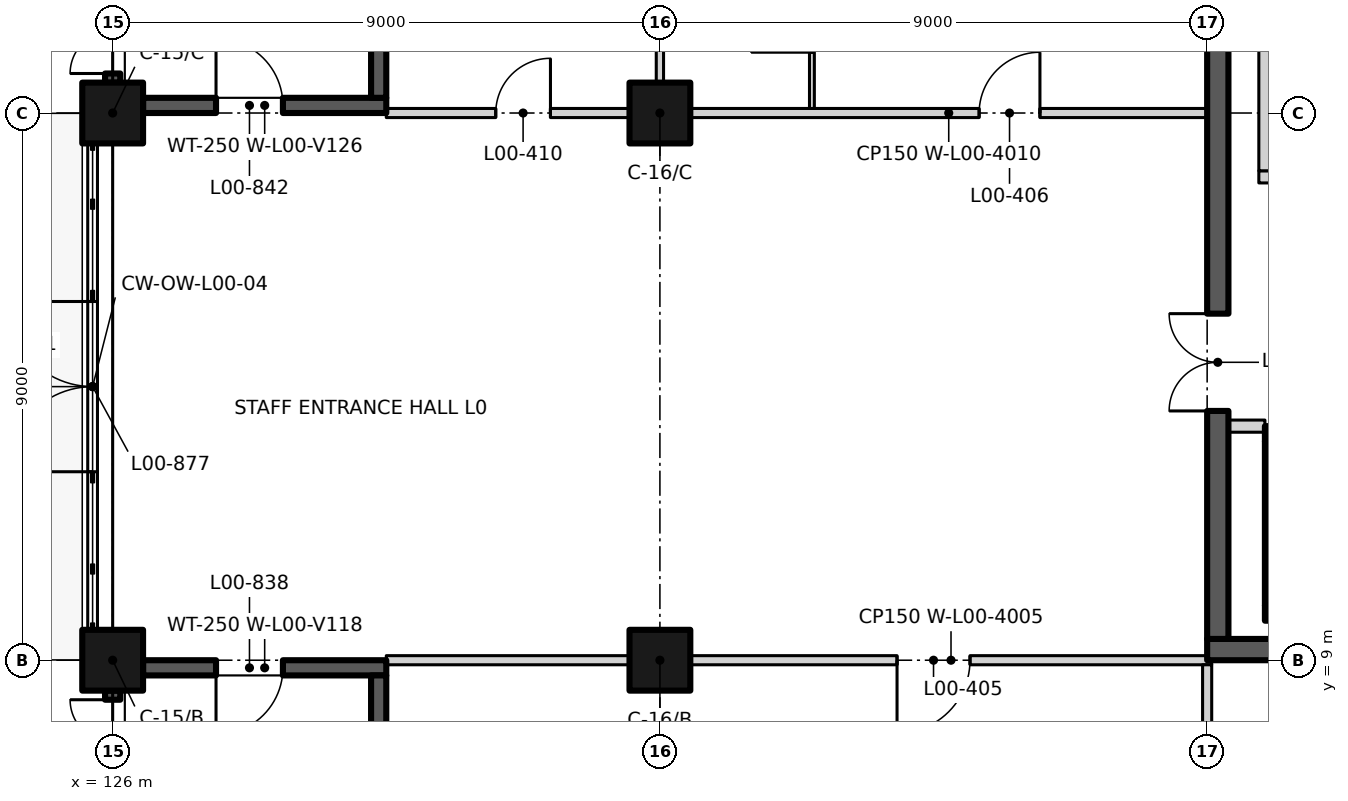
"""IFC4 building model, lengths in metres.
Left out: names, types, materials, properties, quantities, classifications, styles, units other than length and angle.
Written with IfcOpenShell. Run it as: python <this file> out.ifc"""

import sys

from ifc_helpers import new_model, si_unit, direction, frame, frame_2d, origin, origin_2d, place, context, subcontext, project, spatial, rectangle, extrude, element, fill, save


model = new_model("IFC4")
c1 = context("Model", 3, precision=1e-05, world=origin(), true_north=direction((0.0, 1.0)))
c2 = subcontext(c1, "Body", "Model", "MODEL_VIEW")
j1 = project(units=[si_unit("LENGTHUNIT", "METRE"), si_unit("PLANEANGLEUNIT", "RADIAN")], contexts=[c1])
p1 = place(None, origin())
s1 = spatial("IfcSite", under=j1, at=p1, CompositionType="ELEMENT")
p2 = place(p1, origin())
s2 = spatial("IfcBuilding", under=s1, at=p2, CompositionType="ELEMENT")
p3 = place(p2, origin())
s3 = spatial("IfcBuildingStorey", under=s2, at=p3, CompositionType="ELEMENT", Elevation=0.0)
for number, where, z_axis, x_axis in (
    (1, (126.0, 9.0, 0.0), (0.0, 0.0, 1.0), (1.0, 0.0, 0.0)),
    (2, (135.0, 9.0, 0.0), (0.0, 0.0, 1.0), (1.0, 0.0, 0.0)),
    (3, (126.0, 18.0, 0.0), (0.0, 0.0, 1.0), (1.0, 0.0, 0.0)),
    (4, (135.0, 18.0, 0.0), (0.0, 0.0, 1.0), (1.0, 0.0, 0.0)),
):
    element("IfcColumn", number, at=place(p3, frame(where, z_axis=z_axis, x_axis=x_axis)), inside=s3, PredefinedType="COLUMN", context=c2, shape_type="SweptSolid", body=[
        extrude(rectangle(XDim=1.0, YDim=1.0, at=origin_2d()), origin(), (0.0, 0.0, 1.0), 6.0),
    ])
p4 = place(p3, frame((126.5, 8.875, 0.0), z_axis=(0.0, 0.0, 1.0), x_axis=(1.0, 0.0, 0.0)))
e5 = element("IfcWall", 5, at=p4, inside=s3, PredefinedType="SHEAR", context=c2, shape_type="SweptSolid", body=[
    extrude(rectangle(XDim=4.0, YDim=0.25, at=frame_2d((2.0, 0.0))), origin(), (0.0, 0.0, 1.0), 6.0),
])
p5 = place(p4, frame((2.3, 0.0, 0.0), z_axis=(0.0, 0.0, 1.0), x_axis=(-1.0, 0.0, 0.0)))
e6 = element("IfcOpeningElement", 6, at=p5, cuts=e5, PredefinedType="OPENING", context=c2, shape_type="SweptSolid", body=[
    extrude(rectangle(XDim=1.1, YDim=2.1, at=frame_2d((0.55, 1.05))), frame((0.0, 0.135, 0.0), z_axis=(0.0, -1.0, 0.0), x_axis=(1.0, 0.0, 0.0)), (0.0, 0.0, 1.0), 0.27),
])
p6 = place(p3, frame((126.0, 0.5, 0.0), z_axis=(0.0, 0.0, 1.0), x_axis=(0.0, 1.0, 0.0)))
e7 = element("IfcWall", 7, at=p6, inside=s3, PredefinedType="SHEAR", context=c2, shape_type="SweptSolid", body=[
    extrude(rectangle(XDim=8.0, YDim=0.25, at=frame_2d((4.0, 0.0))), origin(), (0.0, 0.0, 1.0), 6.0),
])
p7 = place(p6, frame((6.45, 0.0, 0.0)))
e8 = element("IfcOpeningElement", 8, at=p7, cuts=e7, PredefinedType="OPENING", context=c2, shape_type="SweptSolid", body=[
    extrude(rectangle(XDim=1.4, YDim=2.1, at=frame_2d((0.7, 1.05))), frame((0.0, 0.135, 0.0), z_axis=(0.0, -1.0, 0.0), x_axis=(1.0, 0.0, 0.0)), (0.0, 0.0, 1.0), 0.27),
])
p8 = place(p3, frame((130.375, 0.125, 0.0), z_axis=(0.0, 0.0, 1.0), x_axis=(0.0, 1.0, 0.0)))
e9 = element("IfcWall", 9, at=p8, inside=s3, PredefinedType="SHEAR", context=c2, shape_type="SweptSolid", body=[
    extrude(rectangle(XDim=8.625, YDim=0.25, at=frame_2d((4.312, 0.0))), origin(), (0.0, 0.0, 1.0), 6.0),
])
p9 = place(p3, frame((126.5, 18.125, 0.0), z_axis=(0.0, 0.0, 1.0), x_axis=(1.0, 0.0, 0.0)))
e10 = element("IfcWall", 10, at=p9, inside=s3, PredefinedType="SHEAR", context=c2, shape_type="SweptSolid", body=[
    extrude(rectangle(XDim=4.0, YDim=0.25, at=frame_2d((2.0, 0.0))), origin(), (0.0, 0.0, 1.0), 6.0),
])
p10 = place(p9, frame((1.2, 0.0, 0.0)))
e11 = element("IfcOpeningElement", 11, at=p10, cuts=e10, PredefinedType="OPENING", context=c2, shape_type="SweptSolid", body=[
    extrude(rectangle(XDim=1.1, YDim=2.1, at=frame_2d((0.55, 1.05))), frame((0.0, 0.135, 0.0), z_axis=(0.0, -1.0, 0.0), x_axis=(1.0, 0.0, 0.0)), (0.0, 0.0, 1.0), 0.27),
])
p11 = place(p3, frame((126.0, 18.5, 0.0), z_axis=(0.0, 0.0, 1.0), x_axis=(0.0, 1.0, 0.0)))
e12 = element("IfcWall", 12, at=p11, inside=s3, PredefinedType="SHEAR", context=c2, shape_type="SweptSolid", body=[
    extrude(rectangle(XDim=8.0, YDim=0.25, at=frame_2d((4.0, 0.0))), origin(), (0.0, 0.0, 1.0), 6.0),
])
p12 = place(p11, frame((0.15, 0.0, 0.0)))
e13 = element("IfcOpeningElement", 13, at=p12, cuts=e12, PredefinedType="OPENING", context=c2, shape_type="SweptSolid", body=[
    extrude(rectangle(XDim=1.4, YDim=2.1, at=frame_2d((0.7, 1.05))), frame((0.0, 0.135, 0.0), z_axis=(0.0, -1.0, 0.0), x_axis=(1.0, 0.0, 0.0)), (0.0, 0.0, 1.0), 0.27),
])
p13 = place(p3, frame((130.375, 18.25, 0.0), z_axis=(0.0, 0.0, 1.0), x_axis=(0.0, 1.0, 0.0)))
e14 = element("IfcWall", 14, at=p13, inside=s3, PredefinedType="SHEAR", context=c2, shape_type="SweptSolid", body=[
    extrude(rectangle(XDim=8.625, YDim=0.25, at=frame_2d((4.312, 0.0))), origin(), (0.0, 0.0, 1.0), 6.0),
])
p14 = place(p3, frame((144.95, 12.725, 0.0), z_axis=(0.0, 0.0, 1.0), x_axis=(1.0, 0.0, 0.0)))
e15 = element("IfcWall", 15, at=p14, inside=s3, PredefinedType="SHEAR", context=c2, shape_type="SweptSolid", body=[
    extrude(rectangle(XDim=12.05, YDim=0.25, at=frame_2d((6.025, 0.0))), origin(), (0.0, 0.0, 1.0), 6.0),
])
p15 = place(p14, frame((1.05, 0.0, 0.0)))
e16 = element("IfcOpeningElement", 16, at=p15, cuts=e15, PredefinedType="OPENING", context=c2, shape_type="SweptSolid", body=[
    extrude(rectangle(XDim=1.1, YDim=2.1, at=frame_2d((0.55, 1.05))), frame((0.0, 0.135, 0.0), z_axis=(0.0, -1.0, 0.0), x_axis=(1.0, 0.0, 0.0)), (0.0, 0.0, 1.0), 0.27),
])
p16 = place(p14, frame((4.0, 0.0, 0.0)))
e17 = element("IfcOpeningElement", 17, at=p16, cuts=e15, PredefinedType="OPENING", context=c2, shape_type="SweptSolid", body=[
    extrude(rectangle(XDim=1.1, YDim=2.1, at=frame_2d((0.55, 1.05))), frame((0.0, 0.135, 0.0), z_axis=(0.0, -1.0, 0.0), x_axis=(1.0, 0.0, 0.0)), (0.0, 0.0, 1.0), 0.27),
])
p17 = place(p14, frame((6.95, 0.0, 0.0)))
e18 = element("IfcOpeningElement", 18, at=p17, cuts=e15, PredefinedType="OPENING", context=c2, shape_type="SweptSolid", body=[
    extrude(rectangle(XDim=1.1, YDim=2.1, at=frame_2d((0.55, 1.05))), frame((0.0, 0.135, 0.0), z_axis=(0.0, -1.0, 0.0), x_axis=(1.0, 0.0, 0.0)), (0.0, 0.0, 1.0), 0.27),
])
p18 = place(p14, frame((9.9, 0.0, 0.0)))
e19 = element("IfcOpeningElement", 19, at=p18, cuts=e15, PredefinedType="OPENING", context=c2, shape_type="SweptSolid", body=[
    extrude(rectangle(XDim=1.1, YDim=2.1, at=frame_2d((0.55, 1.05))), frame((0.0, 0.135, 0.0), z_axis=(0.0, -1.0, 0.0), x_axis=(1.0, 0.0, 0.0)), (0.0, 0.0, 1.0), 0.27),
])
p19 = place(p3, frame((144.95, 9.775, 0.0), z_axis=(0.0, 0.0, 1.0), x_axis=(1.0, 0.0, 0.0)))
e20 = element("IfcWall", 20, at=p19, inside=s3, PredefinedType="SHEAR", context=c2, shape_type="SweptSolid", body=[
    extrude(rectangle(XDim=12.05, YDim=0.25, at=frame_2d((6.025, 0.0))), origin(), (0.0, 0.0, 1.0), 6.0),
])
p20 = place(p3, frame((145.075, 9.9, 0.0), z_axis=(0.0, 0.0, 1.0), x_axis=(0.0, 1.0, 0.0)))
e21 = element("IfcWall", 21, at=p20, inside=s3, PredefinedType="SHEAR", context=c2, shape_type="SweptSolid", body=[
    extrude(rectangle(XDim=2.7, YDim=0.25, at=frame_2d((1.35, 0.0))), origin(), (0.0, 0.0, 1.0), 6.0),
])
p21 = place(p3, frame((125.67, 12.03, 0.0), z_axis=(0.0, 0.0, 1.0), x_axis=(0.0, 1.0, 0.0)))
e22 = element("IfcWall", 22, at=p21, inside=s3, PredefinedType="STANDARD", context=c2, shape_type="SweptSolid", body=[
    extrude(rectangle(XDim=2.94, YDim=0.12, at=frame_2d((1.47, 0.0))), origin(), (0.0, 0.0, 1.0), 2.97),
])
p22 = place(p21, frame((0.07, 0.0, 0.0)))
e23 = element("IfcOpeningElement", 23, at=p22, cuts=e22, PredefinedType="OPENING", context=c2, shape_type="SweptSolid", body=[
    extrude(rectangle(XDim=2.8, YDim=2.4, at=frame_2d((1.4, 1.2))), frame((0.0, 0.07, 0.0), z_axis=(0.0, -1.0, 0.0), x_axis=(1.0, 0.0, 0.0)), (0.0, 0.0, 1.0), 0.14),
])
p23 = place(p3, frame((130.5, 9.0, 0.0), z_axis=(0.0, 0.0, 1.0), x_axis=(1.0, 0.0, 0.0)))
e24 = element("IfcWall", 24, at=p23, inside=s3, PredefinedType="PARTITIONING", context=c2, shape_type="SweptSolid", body=[
    extrude(rectangle(XDim=4.0, YDim=0.15, at=frame_2d((2.0, 0.0))), origin(), (0.0, 0.0, 1.0), 5.7),
])
p24 = place(p3, frame((135.5, 9.0, 0.0), z_axis=(0.0, 0.0, 1.0), x_axis=(1.0, 0.0, 0.0)))
e25 = element("IfcWall", 25, at=p24, inside=s3, PredefinedType="PARTITIONING", context=c2, shape_type="SweptSolid", body=[
    extrude(rectangle(XDim=8.575, YDim=0.15, at=frame_2d((4.288, 0.0))), origin(), (0.0, 0.0, 1.0), 5.7),
])
p25 = place(p24, frame((4.6, 0.0, 0.0), z_axis=(0.0, 0.0, 1.0), x_axis=(-1.0, 0.0, 0.0)))
e26 = element("IfcOpeningElement", 26, at=p25, cuts=e25, PredefinedType="OPENING", context=c2, shape_type="SweptSolid", body=[
    extrude(rectangle(XDim=1.2, YDim=2.1, at=frame_2d((0.6, 1.05))), frame((0.0, 0.085, 0.0), z_axis=(0.0, -1.0, 0.0), x_axis=(1.0, 0.0, 0.0)), (0.0, 0.0, 1.0), 0.17),
])
p26 = place(p3, frame((144.0, 9.175, 0.0), z_axis=(0.0, 0.0, 1.0), x_axis=(1.0, 0.0, 0.0)))
e27 = element("IfcWall", 27, at=p26, inside=s3, PredefinedType="SHEAR", context=c2, shape_type="SweptSolid", body=[
    extrude(rectangle(XDim=18.0, YDim=0.35, at=frame_2d((9.0, 0.0))), origin(), (0.0, 0.0, 1.0), 5.7),
])
p27 = place(p26, frame((16.463, 0.0, 0.0), z_axis=(0.0, 0.0, 1.0), x_axis=(-1.0, 0.0, 0.0)))
e28 = element("IfcOpeningElement", 28, at=p27, cuts=e27, PredefinedType="OPENING", context=c2, shape_type="SweptSolid", body=[
    extrude(rectangle(XDim=2.1, YDim=2.4, at=frame_2d((1.05, 1.2))), frame((0.0, 0.185, 0.0), z_axis=(0.0, -1.0, 0.0), x_axis=(1.0, 0.0, 0.0)), (0.0, 0.0, 1.0), 0.37),
])
p28 = place(p3, frame((144.35, 12.85, 0.0), z_axis=(0.0, 0.0, 1.0), x_axis=(1.0, 0.0, 0.0)))
e29 = element("IfcWall", 29, at=p28, inside=s3, PredefinedType="PARTITIONING", context=c2, shape_type="SweptSolid", body=[
    extrude(rectangle(XDim=0.6, YDim=0.2, at=frame_2d((0.3, 0.0))), origin(), (0.0, 0.0, 1.0), 5.7),
])
p29 = place(p3, frame((144.85, 16.95, 0.0), z_axis=(0.0, 0.0, 1.0), x_axis=(1.0, 0.0, 0.0)))
e30 = element("IfcWall", 30, at=p29, inside=s3, PredefinedType="PARTITIONING", context=c2, shape_type="SweptSolid", body=[
    extrude(rectangle(XDim=6.35, YDim=0.2, at=frame_2d((3.175, 0.0))), origin(), (0.0, 0.0, 1.0), 5.7),
])
p30 = place(p29, frame((3.775, 0.0, 0.0), z_axis=(0.0, 0.0, 1.0), x_axis=(-1.0, 0.0, 0.0)))
e31 = element("IfcOpeningElement", 31, at=p30, cuts=e30, PredefinedType="OPENING", context=c2, shape_type="SweptSolid", body=[
    extrude(rectangle(XDim=1.2, YDim=2.1, at=frame_2d((0.6, 1.05))), frame((0.0, 0.11, 0.0), z_axis=(0.0, -1.0, 0.0), x_axis=(1.0, 0.0, 0.0)), (0.0, 0.0, 1.0), 0.22),
])
p31 = place(p3, frame((130.5, 18.0, 0.0), z_axis=(0.0, 0.0, 1.0), x_axis=(1.0, 0.0, 0.0)))
e32 = element("IfcWall", 32, at=p31, inside=s3, PredefinedType="PARTITIONING", context=c2, shape_type="SweptSolid", body=[
    extrude(rectangle(XDim=4.0, YDim=0.15, at=frame_2d((2.0, 0.0))), origin(), (0.0, 0.0, 1.0), 5.7),
])
p32 = place(p31, frame((1.8, 0.0, 0.0)))
e33 = element("IfcOpeningElement", 33, at=p32, cuts=e32, PredefinedType="OPENING", context=c2, shape_type="SweptSolid", body=[
    extrude(rectangle(XDim=0.9, YDim=2.1, at=frame_2d((0.45, 1.05))), frame((0.0, 0.085, 0.0), z_axis=(0.0, -1.0, 0.0), x_axis=(1.0, 0.0, 0.0)), (0.0, 0.0, 1.0), 0.17),
])
p33 = place(p3, frame((135.5, 18.0, 0.0), z_axis=(0.0, 0.0, 1.0), x_axis=(1.0, 0.0, 0.0)))
e34 = element("IfcWall", 34, at=p33, inside=s3, PredefinedType="PARTITIONING", context=c2, shape_type="SweptSolid", body=[
    extrude(rectangle(XDim=8.5, YDim=0.15, at=frame_2d((4.25, 0.0))), origin(), (0.0, 0.0, 1.0), 5.7),
])
p34 = place(p33, frame((4.75, 0.0, 0.0)))
e35 = element("IfcOpeningElement", 35, at=p34, cuts=e34, PredefinedType="OPENING", context=c2, shape_type="SweptSolid", body=[
    extrude(rectangle(XDim=1.0, YDim=2.1, at=frame_2d((0.5, 1.05))), frame((0.0, 0.085, 0.0), z_axis=(0.0, -1.0, 0.0), x_axis=(1.0, 0.0, 0.0)), (0.0, 0.0, 1.0), 0.17),
])
p35 = place(p3, frame((135.0, 18.5, 0.0), z_axis=(0.0, 0.0, 1.0), x_axis=(0.0, 1.0, 0.0)))
e36 = element("IfcWall", 36, at=p35, inside=s3, PredefinedType="PARTITIONING", context=c2, shape_type="SweptSolid", body=[
    extrude(rectangle(XDim=8.0, YDim=0.12, at=frame_2d((4.0, 0.0))), origin(), (0.0, 0.0, 1.0), 5.7),
])
p36 = place(p3, frame((137.5, 18.075, 0.0), z_axis=(0.0, 0.0, 1.0), x_axis=(0.0, 1.0, 0.0)))
e37 = element("IfcWall", 37, at=p36, inside=s3, PredefinedType="PARTITIONING", context=c2, shape_type="SweptSolid", body=[
    extrude(rectangle(XDim=2.885, YDim=0.08, at=frame_2d((1.442, 0.0))), origin(), (0.0, 0.0, 1.0), 5.7),
])
p37 = place(p36, frame((0.925, 0.0, 0.0)))
e38 = element("IfcOpeningElement", 38, at=p37, cuts=e37, PredefinedType="OPENING", context=c2, shape_type="SweptSolid", body=[
    extrude(rectangle(XDim=1.0, YDim=2.1, at=frame_2d((0.5, 1.05))), frame((0.0, 0.05, 0.0), z_axis=(0.0, -1.0, 0.0), x_axis=(1.0, 0.0, 0.0)), (0.0, 0.0, 1.0), 0.1),
])
p38 = place(p3, frame((144.0, 4.575, 0.0), z_axis=(0.0, 0.0, 1.0), x_axis=(0.0, 1.0, 0.0)))
e39 = element("IfcWall", 39, at=p38, inside=s3, PredefinedType="PARTITIONING", context=c2, shape_type="SweptSolid", body=[
    extrude(rectangle(XDim=4.35, YDim=0.15, at=frame_2d((2.175, 0.0))), origin(), (0.0, 0.0, 1.0), 5.7),
])
p39 = place(p3, frame((144.175, 9.35, 0.0), z_axis=(0.0, 0.0, 1.0), x_axis=(0.0, 1.0, 0.0)))
e40 = element("IfcWall", 40, at=p39, inside=s3, PredefinedType="SHEAR", context=c2, shape_type="SweptSolid", body=[
    extrude(rectangle(XDim=17.4, YDim=0.35, at=frame_2d((8.7, 0.0))), origin(), (0.0, 0.0, 1.0), 5.7),
])
p40 = place(p39, frame((3.75, 0.0, 0.0)))
e41 = element("IfcOpeningElement", 41, at=p40, cuts=e40, PredefinedType="OPENING", context=c2, shape_type="SweptSolid", body=[
    extrude(rectangle(XDim=1.6, YDim=2.4, at=frame_2d((0.8, 1.2))), frame((0.0, 0.185, 0.0), z_axis=(0.0, -1.0, 0.0), x_axis=(1.0, 0.0, 0.0)), (0.0, 0.0, 1.0), 0.37),
])
p41 = place(p3, frame((144.95, 17.05, 0.0), z_axis=(0.0, 0.0, 1.0), x_axis=(0.0, 1.0, 0.0)))
e42 = element("IfcWall", 42, at=p41, inside=s3, PredefinedType="PARTITIONING", context=c2, shape_type="SweptSolid", body=[
    extrude(rectangle(XDim=2.8, YDim=0.2, at=frame_2d((1.4, 0.0))), origin(), (0.0, 0.0, 1.0), 5.7),
])
p42 = place(p5, origin())
e43 = element("IfcDoor", 43, at=p42, inside=s3, OperationType="SINGLE_SWING_RIGHT", PredefinedType="DOOR", context=c2, shape_type="SweptSolid", body=[
    extrude(rectangle(XDim=1.1, YDim=2.1, at=frame_2d((0.55, 1.05))), frame((0.0, 0.025, 0.0), z_axis=(0.0, -1.0, 0.0), x_axis=(1.0, 0.0, 0.0)), (0.0, 0.0, 1.0), 0.05),
])
fill(e6, e43)
p43 = place(p7, origin())
e44 = element("IfcDoor", 44, at=p43, inside=s3, OperationType="DOUBLE_DOOR_SINGLE_SWING", PredefinedType="DOOR", context=c2, shape_type="SweptSolid", body=[
    extrude(rectangle(XDim=1.4, YDim=2.1, at=frame_2d((0.7, 1.05))), frame((0.0, 0.025, 0.0), z_axis=(0.0, -1.0, 0.0), x_axis=(1.0, 0.0, 0.0)), (0.0, 0.0, 1.0), 0.05),
])
fill(e8, e44)
p44 = place(p10, origin())
e45 = element("IfcDoor", 45, at=p44, inside=s3, OperationType="SINGLE_SWING_LEFT", PredefinedType="DOOR", context=c2, shape_type="SweptSolid", body=[
    extrude(rectangle(XDim=1.1, YDim=2.1, at=frame_2d((0.55, 1.05))), frame((0.0, 0.025, 0.0), z_axis=(0.0, -1.0, 0.0), x_axis=(1.0, 0.0, 0.0)), (0.0, 0.0, 1.0), 0.05),
])
fill(e11, e45)
p45 = place(p12, origin())
e46 = element("IfcDoor", 46, at=p45, inside=s3, OperationType="DOUBLE_DOOR_SINGLE_SWING", PredefinedType="DOOR", context=c2, shape_type="SweptSolid", body=[
    extrude(rectangle(XDim=1.4, YDim=2.1, at=frame_2d((0.7, 1.05))), frame((0.0, 0.025, 0.0), z_axis=(0.0, -1.0, 0.0), x_axis=(1.0, 0.0, 0.0)), (0.0, 0.0, 1.0), 0.05),
])
fill(e13, e46)
p46 = place(p22, origin())
e47 = element("IfcDoor", 47, at=p46, inside=s3, OperationType="DOUBLE_DOOR_SINGLE_SWING", PredefinedType="DOOR", context=c2, shape_type="SweptSolid", body=[
    extrude(rectangle(XDim=2.8, YDim=2.4, at=frame_2d((1.4, 1.2))), frame((0.0, 0.025, 0.0), z_axis=(0.0, -1.0, 0.0), x_axis=(1.0, 0.0, 0.0)), (0.0, 0.0, 1.0), 0.05),
])
fill(e23, e47)
p47 = place(p40, origin())
e48 = element("IfcDoor", 48, at=p47, inside=s3, OperationType="DOUBLE_DOOR_SINGLE_SWING", PredefinedType="DOOR", context=c2, shape_type="SweptSolid", body=[
    extrude(rectangle(XDim=1.6, YDim=2.4, at=frame_2d((0.8, 1.2))), frame((0.0, 0.025, 0.0), z_axis=(0.0, -1.0, 0.0), x_axis=(1.0, 0.0, 0.0)), (0.0, 0.0, 1.0), 0.05),
])
fill(e41, e48)
p48 = place(p25, origin())
e49 = element("IfcDoor", 49, at=p48, inside=s3, OperationType="SINGLE_SWING_RIGHT", PredefinedType="DOOR", context=c2, shape_type="SweptSolid", body=[
    extrude(rectangle(XDim=1.2, YDim=2.1, at=frame_2d((0.6, 1.05))), frame((0.0, 0.025, 0.0), z_axis=(0.0, -1.0, 0.0), x_axis=(1.0, 0.0, 0.0)), (0.0, 0.0, 1.0), 0.05),
])
fill(e26, e49)
p49 = place(p34, origin())
e50 = element("IfcDoor", 50, at=p49, inside=s3, OperationType="SINGLE_SWING_RIGHT", PredefinedType="DOOR", context=c2, shape_type="SweptSolid", body=[
    extrude(rectangle(XDim=1.0, YDim=2.1, at=frame_2d((0.5, 1.05))), frame((0.0, 0.025, 0.0), z_axis=(0.0, -1.0, 0.0), x_axis=(1.0, 0.0, 0.0)), (0.0, 0.0, 1.0), 0.05),
])
fill(e35, e50)
p50 = place(p32, origin())
e51 = element("IfcDoor", 51, at=p50, inside=s3, OperationType="SINGLE_SWING_RIGHT", PredefinedType="DOOR", context=c2, shape_type="SweptSolid", body=[
    extrude(rectangle(XDim=0.9, YDim=2.1, at=frame_2d((0.45, 1.05))), frame((0.0, 0.025, 0.0), z_axis=(0.0, -1.0, 0.0), x_axis=(1.0, 0.0, 0.0)), (0.0, 0.0, 1.0), 0.05),
])
fill(e33, e51)
save(model, sys.argv[1])
